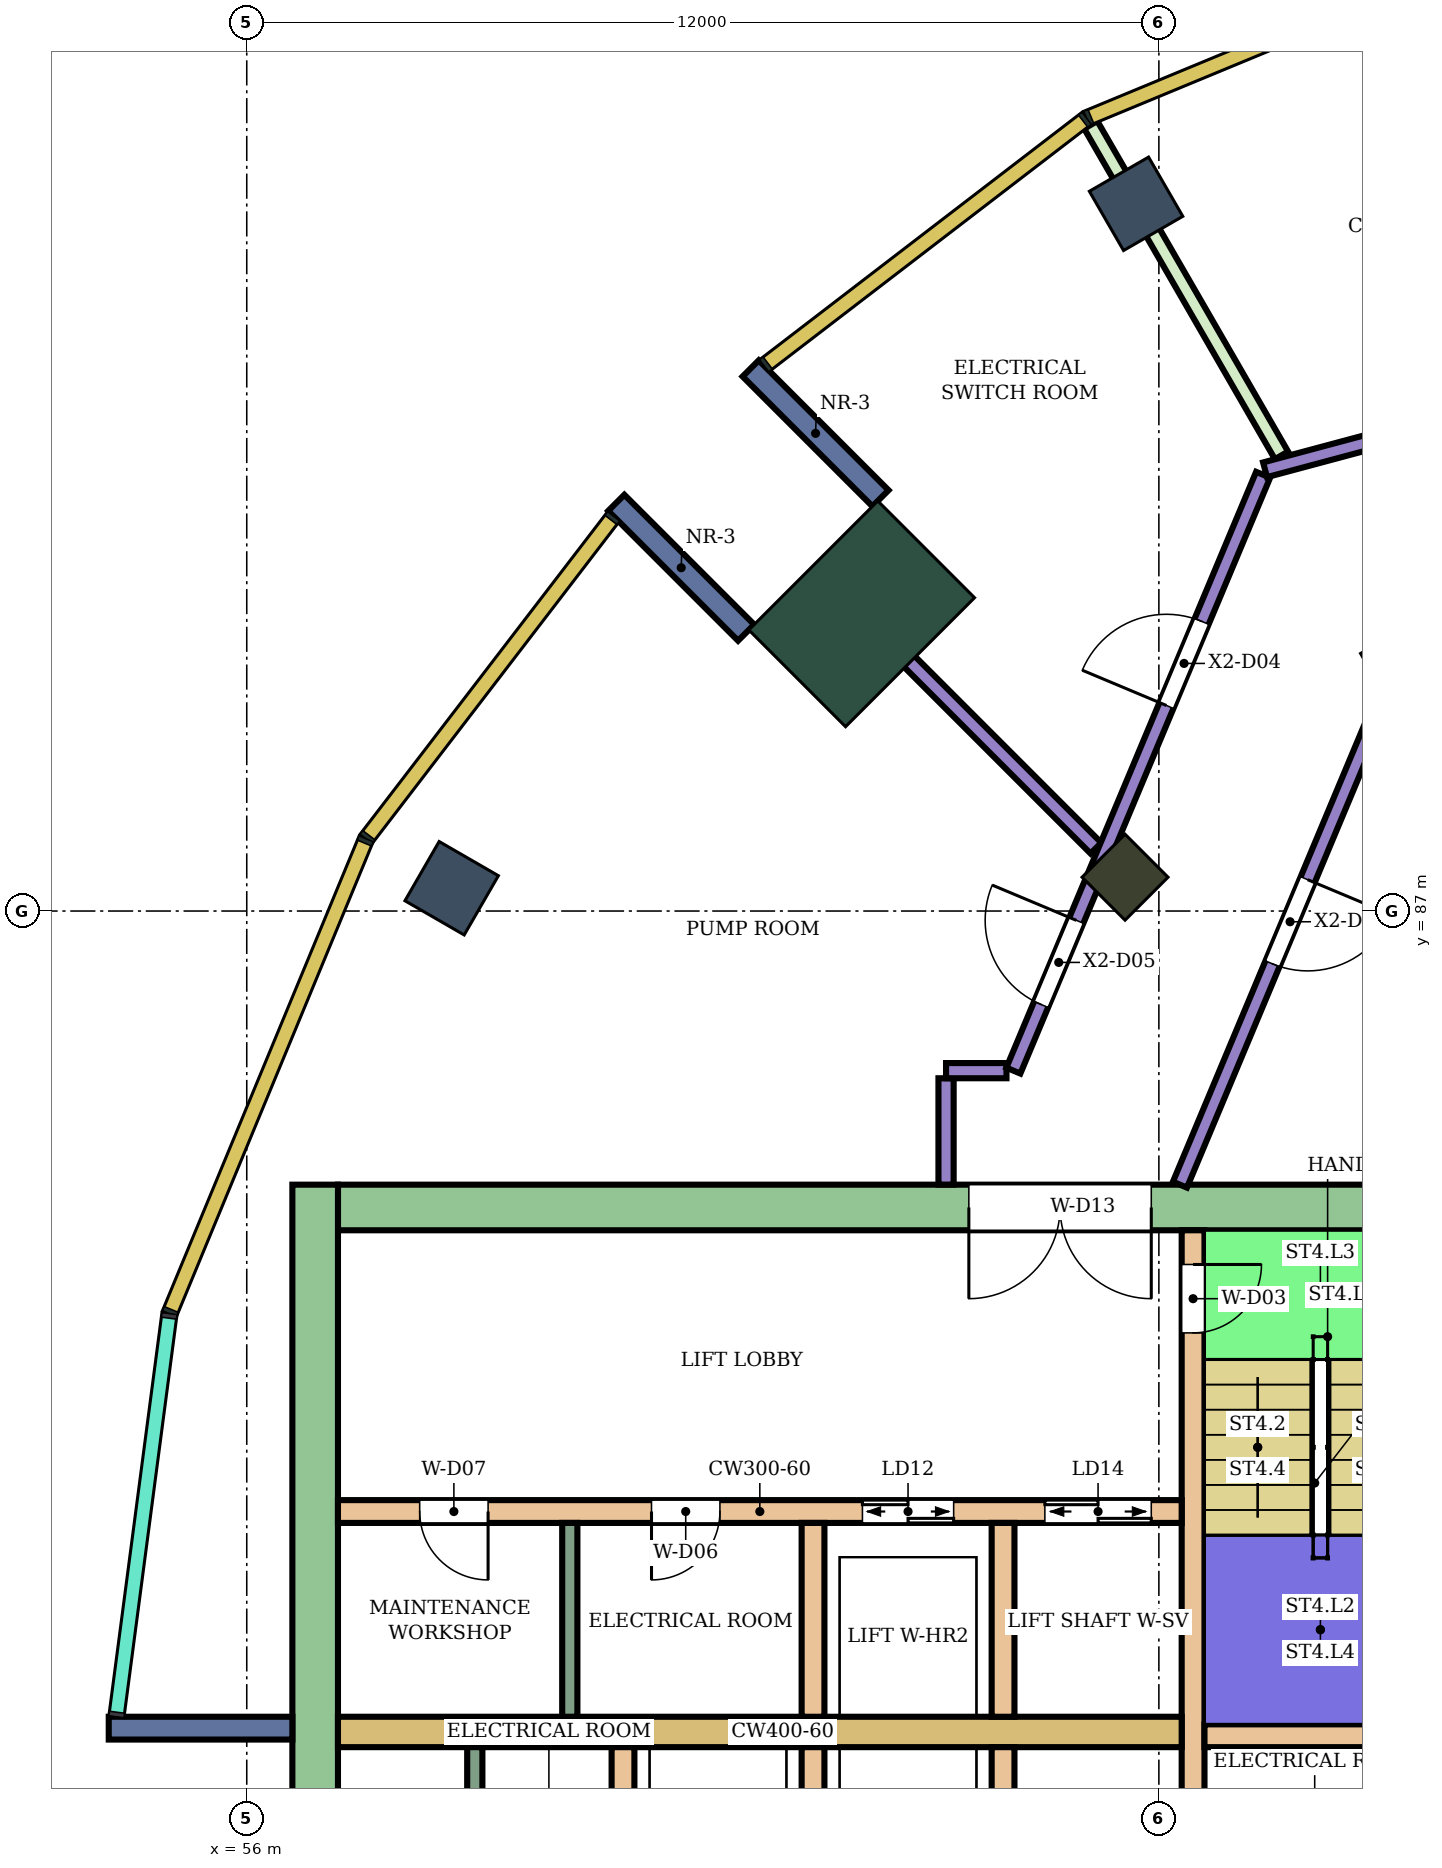
"""IFC4 building model, lengths in metres.
Left out: names, types, materials, properties, quantities, classifications, styles, units other than length and angle.
Written with IfcOpenShell. Run it as: python <this file> out.ifc"""

import sys

from ifc_helpers import new_model, si_unit, direction, frame, frame_2d, origin, origin_2d, place, context, subcontext, project, spatial, rectangle, extrude, element, fill, save


model = new_model("IFC4")
c1 = context("Model", 3, precision=1e-05, world=origin(), true_north=direction((0.0, 1.0)))
c2 = subcontext(c1, "Body", "Model", "MODEL_VIEW")
j1 = project(units=[si_unit("LENGTHUNIT", "METRE"), si_unit("PLANEANGLEUNIT", "RADIAN")], contexts=[c1])
p1 = place(None, origin())
s1 = spatial("IfcSite", under=j1, at=p1, CompositionType="ELEMENT")
p2 = place(p1, origin())
s2 = spatial("IfcBuilding", under=s1, at=p2, CompositionType="ELEMENT")
p3 = place(p2, frame((0.0, 0.0, 206.9)))
s3 = spatial("IfcBuildingStorey", under=s2, at=p3, CompositionType="ELEMENT", Elevation=206.9)
for number, where, z_axis, x_axis in (
    (1, (67.7, 96.304, 0.0), (0.0, 0.0, 1.0), (-0.5, 0.866, 0.0)),
    (2, (58.696, 87.3, 0.0), (0.0, 0.0, 1.0), (-0.866, 0.5, 0.0)),
):
    element("IfcColumn", number, at=place(p3, frame(where, z_axis=z_axis, x_axis=x_axis)), inside=s3, PredefinedType="COLUMN", context=c2, shape_type="SweptSolid", body=[
        extrude(rectangle(XDim=0.9, YDim=0.9, at=origin_2d()), origin(), (0.0, 0.0, 1.0), 5.6),
    ])
for number, where, z_axis, x_axis in (
    (3, (71.2, 90.242, 0.0), (0.0, 0.0, 1.0), (-0.5, 0.866, 0.0)),
    (4, (67.555, 87.445, 0.0), (0.0, 0.0, 1.0), (-0.707, 0.707, 0.0)),
):
    element("IfcColumn", number, at=place(p3, frame(where, z_axis=z_axis, x_axis=x_axis)), inside=s3, PredefinedType="COLUMN", context=c2, shape_type="SweptSolid", body=[
        extrude(rectangle(XDim=0.8, YDim=0.8, at=origin_2d()), origin(), (0.0, 0.0, 1.0), 5.6),
    ])
p4 = place(p3, frame((64.09, 90.91, 0.0), z_axis=(0.0, 0.0, 1.0), x_axis=(-0.707106781187, 0.707106781187, 0.0)))
e5 = element("IfcColumn", 5, at=p4, inside=s3, PredefinedType="COLUMN", context=c2, shape_type="SweptSolid", body=[
    extrude(rectangle(XDim=1.8, YDim=2.4, at=origin_2d()), origin(), (0.0, 0.0, 1.0), 5.6),
])
p5 = place(p3, frame((72.1, 83.1, 0.0), z_axis=(0.0, 0.0, 1.0), x_axis=(-1.0, 0.0, 0.0)))
e6 = element("IfcWall", 6, at=p5, inside=s3, PredefinedType="SHEAR", context=c2, shape_type="SweptSolid", body=[
    extrude(rectangle(XDim=14.9, YDim=0.6, at=frame_2d((7.45, 0.0))), origin(), (0.0, 0.0, 1.0), 5.28),
])
p6 = place(p5, frame((4.2, 0.0, 0.0)))
e7 = element("IfcOpeningElement", 7, at=p6, cuts=e6, PredefinedType="OPENING", context=c2, shape_type="SweptSolid", body=[
    extrude(rectangle(XDim=2.4, YDim=2.4, at=frame_2d((1.2, 1.2))), frame((0.0, 0.31, 0.0), z_axis=(0.0, -1.0, 0.0), x_axis=(1.0, 0.0, 0.0)), (0.0, 0.0, 1.0), 0.62),
])
p7 = place(p3, frame((56.9, 83.4, 0.0), z_axis=(0.0, 0.0, 1.0), x_axis=(0.0, -1.0, 0.0)))
e8 = element("IfcWall", 8, at=p7, inside=s3, PredefinedType="SHEAR", context=c2, shape_type="SweptSolid", body=[
    extrude(rectangle(XDim=16.8, YDim=0.6, at=frame_2d((8.4, 0.0))), origin(), (0.0, 0.0, 1.0), 5.28),
])
p8 = place(p3, frame((68.45, 82.8, 0.0), z_axis=(0.0, 0.0, 1.0), x_axis=(0.0, -1.0, 0.0)))
e9 = element("IfcWall", 9, at=p8, inside=s3, PredefinedType="SHEAR", context=c2, shape_type="SweptSolid", body=[
    extrude(rectangle(XDim=7.8, YDim=0.3, at=frame_2d((3.9, 0.0))), origin(), (0.0, 0.0, 1.0), 5.28),
])
p9 = place(p8, frame((0.45, 0.0, 0.0)))
e10 = element("IfcOpeningElement", 10, at=p9, cuts=e9, PredefinedType="OPENING", context=c2, shape_type="SweptSolid", body=[
    extrude(rectangle(XDim=0.9, YDim=2.1, at=frame_2d((0.45, 1.05))), frame((0.0, 0.16, 0.0), z_axis=(0.0, -1.0, 0.0), x_axis=(1.0, 0.0, 0.0)), (0.0, 0.0, 1.0), 0.32),
])
p10 = place(p3, frame((71.65, 76.15, 0.0), z_axis=(0.0, 0.0, 1.0), x_axis=(-1.0, 0.0, 0.0)))
e11 = element("IfcWall", 11, at=p10, inside=s3, PredefinedType="SHEAR", context=c2, shape_type="SweptSolid", body=[
    extrude(rectangle(XDim=3.05, YDim=0.3, at=frame_2d((1.525, 0.0))), origin(), (0.0, 0.0, 1.0), 5.28),
])
p11 = place(p3, frame((68.3, 76.2, 0.0), z_axis=(0.0, 0.0, 1.0), x_axis=(-1.0, 0.0, 0.0)))
e12 = element("IfcWall", 12, at=p11, inside=s3, PredefinedType="SHEAR", context=c2, shape_type="SweptSolid", body=[
    extrude(rectangle(XDim=11.1, YDim=0.4, at=frame_2d((5.55, 0.0))), origin(), (0.0, 0.0, 1.0), 5.28),
])
p12 = place(p3, frame((68.3, 79.1, 0.0), z_axis=(0.0, 0.0, 1.0), x_axis=(-1.0, 0.0, 0.0)))
e13 = element("IfcWall", 13, at=p12, inside=s3, PredefinedType="SHEAR", context=c2, shape_type="SweptSolid", body=[
    extrude(rectangle(XDim=11.1, YDim=0.3, at=frame_2d((5.55, 0.0))), origin(), (0.0, 0.0, 1.0), 5.28),
])
p13 = place(p12, frame((0.4, 0.0, 0.0)))
e14 = element("IfcOpeningElement", 14, at=p13, cuts=e13, PredefinedType="OPENING", context=c2, shape_type="SweptSolid", body=[
    extrude(rectangle(XDim=1.4, YDim=2.1, at=frame_2d((0.7, 1.05))), frame((0.0, 0.16, 0.0), z_axis=(0.0, -1.0, 0.0), x_axis=(1.0, 0.0, 0.0)), (0.0, 0.0, 1.0), 0.32),
])
p14 = place(p12, frame((3.0, 0.0, 0.0)))
e15 = element("IfcOpeningElement", 15, at=p14, cuts=e13, PredefinedType="OPENING", context=c2, shape_type="SweptSolid", body=[
    extrude(rectangle(XDim=1.2, YDim=2.1, at=frame_2d((0.6, 1.05))), frame((0.0, 0.16, 0.0), z_axis=(0.0, -1.0, 0.0), x_axis=(1.0, 0.0, 0.0)), (0.0, 0.0, 1.0), 0.32),
])
p15 = place(p12, frame((6.075, 0.0, 0.0)))
e16 = element("IfcOpeningElement", 16, at=p15, cuts=e13, PredefinedType="OPENING", context=c2, shape_type="SweptSolid", body=[
    extrude(rectangle(XDim=0.9, YDim=2.1, at=frame_2d((0.45, 1.05))), frame((0.0, 0.16, 0.0), z_axis=(0.0, -1.0, 0.0), x_axis=(1.0, 0.0, 0.0)), (0.0, 0.0, 1.0), 0.32),
])
p16 = place(p12, frame((9.125, 0.0, 0.0)))
e17 = element("IfcOpeningElement", 17, at=p16, cuts=e13, PredefinedType="OPENING", context=c2, shape_type="SweptSolid", body=[
    extrude(rectangle(XDim=0.9, YDim=2.1, at=frame_2d((0.45, 1.05))), frame((0.0, 0.16, 0.0), z_axis=(0.0, -1.0, 0.0), x_axis=(1.0, 0.0, 0.0)), (0.0, 0.0, 1.0), 0.32),
])
for number, where, z_axis, x_axis in (
    (18, (65.95, 76.0, 0.0), (0.0, 0.0, 1.0), (0.0, -1.0, 0.0)),
    (19, (63.45, 76.0, 0.0), (0.0, 0.0, 1.0), (0.0, -1.0, 0.0)),
    (20, (60.95, 76.0, 0.0), (0.0, 0.0, 1.0), (0.0, -1.0, 0.0)),
    (21, (65.95, 78.95, 0.0), (0.0, 0.0, 1.0), (0.0, -1.0, 0.0)),
    (22, (63.45, 78.95, 0.0), (0.0, 0.0, 1.0), (0.0, -1.0, 0.0)),
):
    element("IfcWall", number, at=place(p3, frame(where, z_axis=z_axis, x_axis=x_axis)), inside=s3, PredefinedType="SHEAR", context=c2, shape_type="SweptSolid", body=[
        extrude(rectangle(XDim=2.55, YDim=0.3, at=frame_2d((1.275, 0.0))), origin(), (0.0, 0.0, 1.0), 5.28),
    ])
for number, where, z_axis, x_axis in (
    (23, (64.338, 92.43, 0.0), (0.0, 0.0, 1.0), (-0.707, 0.707, 0.0)),
    (24, (62.57, 90.662, 0.0), (0.0, 0.0, 1.0), (-0.707, 0.707, 0.0)),
    (25, (56.6, 76.25, 0.0), (0.0, 0.0, 1.0), (-1.0, 0.0, 0.0)),
):
    element("IfcWall", number, at=place(p3, frame(where, z_axis=z_axis, x_axis=x_axis)), inside=s3, PredefinedType="NOTDEFINED", context=c2, shape_type="SweptSolid", body=[
        extrude(rectangle(XDim=2.416, YDim=0.3, at=frame_2d((1.208, 0.0))), origin(), (0.0, 0.0, 1.0), 5.6),
    ])
p17 = place(p3, frame((63.595, 91.405, 0.0), z_axis=(0.0, 0.0, 1.0), x_axis=(0.707010247839, -0.707203301357, 0.0)))
e26 = element("IfcWall", 26, at=p17, inside=s3, PredefinedType="PARTITIONING", context=c2, shape_type="SweptSolid", body=[
    extrude(rectangle(XDim=5.059, YDim=0.2, at=frame_2d((2.529, 0.0))), origin(), (0.0, 0.0, 1.0), 5.15),
])
p18 = place(p3, frame((65.2, 83.401, 0.0), z_axis=(0.0, 0.0, 1.0), x_axis=(0.0, 1.0, 0.0)))
e27 = element("IfcWall", 27, at=p18, inside=s3, PredefinedType="PARTITIONING", context=c2, shape_type="SweptSolid", body=[
    extrude(rectangle(XDim=1.399, YDim=0.2, at=frame_2d((0.7, 0.0))), origin(), (0.0, 0.0, 1.0), 5.15),
])
p19 = place(p3, frame((65.2, 84.9, 0.0), z_axis=(0.0, 0.0, 1.0), x_axis=(1.0, 0.0, 0.0)))
e28 = element("IfcWall", 28, at=p19, inside=s3, PredefinedType="PARTITIONING", context=c2, shape_type="SweptSolid", body=[
    extrude(rectangle(XDim=0.795, YDim=0.2, at=frame_2d((0.397, 0.0))), origin(), (0.0, 0.0, 1.0), 5.15),
])
p20 = place(p3, frame((66.086, 84.9, 0.0), z_axis=(0.0, 0.0, 1.0), x_axis=(0.386558053719, 0.922265076377, 0.0)))
e29 = element("IfcWall", 29, at=p20, inside=s3, PredefinedType="PARTITIONING", context=c2, shape_type="SweptSolid", body=[
    extrude(rectangle(XDim=8.5, YDim=0.2, at=frame_2d((4.25, 0.0))), origin(), (0.0, 0.0, 1.0), 5.15),
])
p21 = place(p20, frame((5.209, 0.0, 0.0)))
e30 = element("IfcOpeningElement", 30, at=p21, cuts=e29, PredefinedType="OPENING", context=c2, shape_type="SweptSolid", body=[
    extrude(rectangle(XDim=1.2, YDim=2.4, at=frame_2d((0.6, 1.2))), frame((0.0, 0.11, 0.0), z_axis=(0.0, -1.0, 0.0), x_axis=(1.0, 0.0, 0.0)), (0.0, 0.0, 1.0), 0.22),
])
p22 = place(p20, frame((0.944, 0.0, 0.0)))
e31 = element("IfcOpeningElement", 31, at=p22, cuts=e29, PredefinedType="OPENING", context=c2, shape_type="SweptSolid", body=[
    extrude(rectangle(XDim=1.2, YDim=2.4, at=frame_2d((0.6, 1.2))), frame((0.0, 0.11, 0.0), z_axis=(0.0, -1.0, 0.0), x_axis=(1.0, 0.0, 0.0)), (0.0, 0.0, 1.0), 0.22),
])
p23 = place(p3, frame((67.104, 97.343, 0.0), z_axis=(0.0, 0.0, 1.0), x_axis=(0.499904868165, -0.866080321209, 0.0)))
e32 = element("IfcWall", 32, at=p23, inside=s3, PredefinedType="PARTITIONING", context=c2, shape_type="SweptSolid", body=[
    extrude(rectangle(XDim=5.021, YDim=0.2, at=frame_2d((2.51, 0.0))), origin(), (0.0, 0.0, 1.0), 4.667),
])
p24 = place(p3, frame((68.277, 83.4, 0.0), z_axis=(0.0, 0.0, 1.0), x_axis=(0.386363382968, 0.922346646495, 0.0)))
e33 = element("IfcWall", 33, at=p24, inside=s3, PredefinedType="PARTITIONING", context=c2, shape_type="SweptSolid", body=[
    extrude(rectangle(XDim=7.762, YDim=0.2, at=frame_2d((3.881, 0.0))), origin(), (0.0, 0.0, 1.0), 5.15),
])
p25 = place(p24, frame((3.15, 0.0, 0.0)))
e34 = element("IfcOpeningElement", 34, at=p25, cuts=e33, PredefinedType="OPENING", context=c2, shape_type="SweptSolid", body=[
    extrude(rectangle(XDim=1.2, YDim=2.4, at=frame_2d((0.6, 1.2))), frame((0.0, 0.11, 0.0), z_axis=(0.0, -1.0, 0.0), x_axis=(1.0, 0.0, 0.0)), (0.0, 0.0, 1.0), 0.22),
])
p26 = place(p3, frame((69.397, 92.805, 0.0), z_axis=(0.0, 0.0, 1.0), x_axis=(0.965949547217, 0.258730501163, 0.0)))
e35 = element("IfcWall", 35, at=p26, inside=s3, PredefinedType="PARTITIONING", context=c2, shape_type="SweptSolid", body=[
    extrude(rectangle(XDim=10.927, YDim=0.2, at=frame_2d((5.463, 0.0))), origin(), (0.0, 0.0, 1.0), 5.15),
])
p27 = place(p26, frame((5.023, 0.0, 0.0)))
e36 = element("IfcOpeningElement", 36, at=p27, cuts=e35, PredefinedType="OPENING", context=c2, shape_type="SweptSolid", body=[
    extrude(rectangle(XDim=1.2, YDim=2.4, at=frame_2d((0.6, 1.2))), frame((0.0, 0.11, 0.0), z_axis=(0.0, -1.0, 0.0), x_axis=(1.0, 0.0, 0.0)), (0.0, 0.0, 1.0), 0.22),
])
for number, where, z_axis, x_axis in (
    (37, (59.0, 76.0, 0.0), (0.0, 0.0, 1.0), (0.0, -1.0, 0.0)),
    (38, (60.25, 78.95, 0.0), (0.0, 0.0, 1.0), (0.0, -1.0, 0.0)),
):
    element("IfcWall", number, at=place(p3, frame(where, z_axis=z_axis, x_axis=x_axis)), inside=s3, PredefinedType="PARTITIONING", context=c2, shape_type="SweptSolid", body=[
        extrude(rectangle(XDim=2.55, YDim=0.2, at=frame_2d((1.275, 0.0))), origin(), (0.0, 0.0, 1.0), 5.28),
    ])
p28 = place(p21, origin())
e39 = element("IfcDoor", 39, at=p28, inside=s3, OperationType="SINGLE_SWING_LEFT", PredefinedType="DOOR", context=c2, shape_type="SweptSolid", body=[
    extrude(rectangle(XDim=1.2, YDim=2.4, at=frame_2d((0.6, 1.2))), frame((0.0, 0.025, 0.0), z_axis=(0.0, -1.0, 0.0), x_axis=(1.0, 0.0, 0.0)), (0.0, 0.0, 1.0), 0.05),
])
fill(e30, e39)
p29 = place(p22, origin())
e40 = element("IfcDoor", 40, at=p29, inside=s3, OperationType="SINGLE_SWING_RIGHT", PredefinedType="DOOR", context=c2, shape_type="SweptSolid", body=[
    extrude(rectangle(XDim=1.2, YDim=2.4, at=frame_2d((0.6, 1.2))), frame((0.0, 0.025, 0.0), z_axis=(0.0, -1.0, 0.0), x_axis=(1.0, 0.0, 0.0)), (0.0, 0.0, 1.0), 0.05),
])
fill(e31, e40)
p30 = place(p25, frame((1.2, 0.0, 0.0), z_axis=(0.0, 0.0, 1.0), x_axis=(-1.0, 0.0, 0.0)))
e41 = element("IfcDoor", 41, at=p30, inside=s3, OperationType="SINGLE_SWING_LEFT", PredefinedType="DOOR", context=c2, shape_type="SweptSolid", body=[
    extrude(rectangle(XDim=1.2, YDim=2.4, at=frame_2d((0.6, 1.2))), frame((0.0, 0.025, 0.0), z_axis=(0.0, -1.0, 0.0), x_axis=(1.0, 0.0, 0.0)), (0.0, 0.0, 1.0), 0.05),
])
fill(e34, e41)
p31 = place(p9, origin())
e42 = element("IfcDoor", 42, at=p31, inside=s3, OperationType="SINGLE_SWING_LEFT", PredefinedType="DOOR", context=c2, shape_type="SweptSolid", body=[
    extrude(rectangle(XDim=0.9, YDim=2.1, at=frame_2d((0.45, 1.05))), frame((0.0, 0.025, 0.0), z_axis=(0.0, -1.0, 0.0), x_axis=(1.0, 0.0, 0.0)), (0.0, 0.0, 1.0), 0.05),
])
fill(e10, e42)
p32 = place(p13, origin())
e43 = element("IfcDoor", 43, at=p32, inside=s3, OperationType="DOUBLE_DOOR_SLIDING", PredefinedType="DOOR", context=c2, shape_type="SweptSolid", body=[
    extrude(rectangle(XDim=1.4, YDim=2.1, at=frame_2d((0.7, 1.05))), frame((0.0, 0.025, 0.0), z_axis=(0.0, -1.0, 0.0), x_axis=(1.0, 0.0, 0.0)), (0.0, 0.0, 1.0), 0.05),
])
fill(e14, e43)
p33 = place(p14, origin())
e44 = element("IfcDoor", 44, at=p33, inside=s3, OperationType="DOUBLE_DOOR_SLIDING", PredefinedType="DOOR", context=c2, shape_type="SweptSolid", body=[
    extrude(rectangle(XDim=1.2, YDim=2.1, at=frame_2d((0.6, 1.05))), frame((0.0, 0.025, 0.0), z_axis=(0.0, -1.0, 0.0), x_axis=(1.0, 0.0, 0.0)), (0.0, 0.0, 1.0), 0.05),
])
fill(e15, e44)
p34 = place(p15, origin())
e45 = element("IfcDoor", 45, at=p34, inside=s3, OperationType="SINGLE_SWING_RIGHT", PredefinedType="DOOR", context=c2, shape_type="SweptSolid", body=[
    extrude(rectangle(XDim=0.9, YDim=2.1, at=frame_2d((0.45, 1.05))), frame((0.0, 0.025, 0.0), z_axis=(0.0, -1.0, 0.0), x_axis=(1.0, 0.0, 0.0)), (0.0, 0.0, 1.0), 0.05),
])
fill(e16, e45)
p35 = place(p16, origin())
e46 = element("IfcDoor", 46, at=p35, inside=s3, OperationType="SINGLE_SWING_LEFT", PredefinedType="DOOR", context=c2, shape_type="SweptSolid", body=[
    extrude(rectangle(XDim=0.9, YDim=2.1, at=frame_2d((0.45, 1.05))), frame((0.0, 0.025, 0.0), z_axis=(0.0, -1.0, 0.0), x_axis=(1.0, 0.0, 0.0)), (0.0, 0.0, 1.0), 0.05),
])
fill(e17, e46)
p36 = place(p6, origin())
e47 = element("IfcDoor", 47, at=p36, inside=s3, OperationType="DOUBLE_DOOR_SINGLE_SWING", PredefinedType="DOOR", context=c2, shape_type="SweptSolid", body=[
    extrude(rectangle(XDim=2.4, YDim=2.4, at=frame_2d((1.2, 1.2))), frame((0.0, 0.025, 0.0), z_axis=(0.0, -1.0, 0.0), x_axis=(1.0, 0.0, 0.0)), (0.0, 0.0, 1.0), 0.05),
])
fill(e7, e47)
save(model, sys.argv[1])
